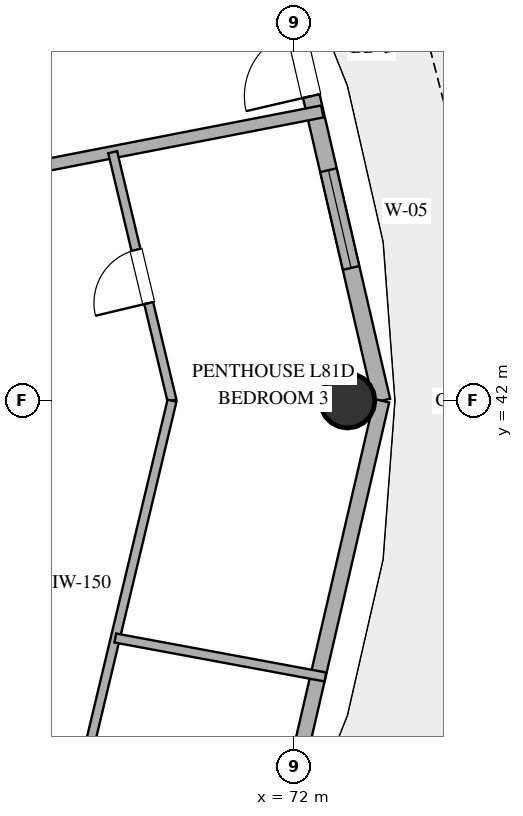
"""IFC4 building model, lengths in metres.
Left out: names, types, materials, properties, quantities, classifications, styles, units other than length and angle.
Written with IfcOpenShell. Run it as: python <this file> out.ifc"""

import sys

from ifc_helpers import new_model, si_unit, direction, frame, frame_2d, origin, origin_2d, place, context, subcontext, project, spatial, rectangle, hollow_circle, extrude, element, fill, save


model = new_model("IFC4")
c1 = context("Model", 3, precision=1e-05, world=origin(), true_north=direction((0.0, 1.0)))
c2 = subcontext(c1, "Body", "Model", "MODEL_VIEW")
j1 = project(units=[si_unit("LENGTHUNIT", "METRE"), si_unit("PLANEANGLEUNIT", "RADIAN")], contexts=[c1])
p1 = place(None, origin())
s1 = spatial("IfcSite", under=j1, at=p1, CompositionType="ELEMENT")
p2 = place(p1, origin())
s2 = spatial("IfcBuilding", under=s1, at=p2, CompositionType="ELEMENT")
p3 = place(p2, frame((0.0, 0.0, 312.6)))
s3 = spatial("IfcBuildingStorey", under=s2, at=p3, CompositionType="ELEMENT", Elevation=312.6)
p4 = place(p3, frame((72.883, 42.0, 0.0), z_axis=(0.0, 0.0, 1.0), x_axis=(1.0, 0.0, 0.0)))
e1 = element("IfcColumn", 1, at=p4, inside=s3, PredefinedType="COLUMN", context=c2, shape_type="SweptSolid", body=[
    extrude(hollow_circle(Radius=0.45, WallThickness=0.025, at=origin_2d()), origin(), (0.0, 0.0, 1.0), 3.64),
])
p5 = place(p3, frame((73.447, 42.0, 0.0), z_axis=(0.0, 0.0, 1.0), x_axis=(-0.225635078214, 0.974211892495, 0.0)))
e2 = element("IfcWall", 2, at=p5, inside=s3, PredefinedType="SOLIDWALL", context=c2, shape_type="SweptSolid", body=[
    extrude(rectangle(XDim=7.77, YDim=0.28, at=frame_2d((3.885, 0.0))), origin(), (0.0, 0.0, 1.0), 3.64),
])
p6 = place(p5, frame((2.241, 0.0, 0.85)))
e3 = element("IfcOpeningElement", 3, at=p6, cuts=e2, PredefinedType="OPENING", context=c2, shape_type="SweptSolid", body=[
    extrude(rectangle(XDim=1.65, YDim=2.0, at=frame_2d((0.825, 1.0))), frame((0.0, 0.15, 0.0), z_axis=(0.0, -1.0, 0.0), x_axis=(1.0, 0.0, 0.0)), (0.0, 0.0, 1.0), 0.3),
])
p7 = place(p5, frame((5.142, 0.0, 0.0)))
e4 = element("IfcOpeningElement", 4, at=p7, cuts=e2, PredefinedType="OPENING", context=c2, shape_type="SweptSolid", body=[
    extrude(rectangle(XDim=1.1, YDim=2.25, at=frame_2d((0.55, 1.125))), frame((0.0, 0.15, 0.0), z_axis=(0.0, -1.0, 0.0), x_axis=(1.0, 0.0, 0.0)), (0.0, 0.0, 1.0), 0.3),
])
p8 = place(p3, frame((71.694, 34.43, 0.0), z_axis=(0.0, 0.0, 1.0), x_axis=(0.225635078214, 0.974211892495, 0.0)))
e5 = element("IfcWall", 5, at=p8, inside=s3, PredefinedType="SOLIDWALL", context=c2, shape_type="SweptSolid", body=[
    extrude(rectangle(XDim=7.77, YDim=0.25, at=frame_2d((3.885, 0.0))), origin(), (0.0, 0.0, 1.0), 3.64),
])
p9 = place(p3, frame((61.2, 44.566, 0.0), z_axis=(0.0, 0.0, 1.0), x_axis=(0.981626456647, 0.190812734402, 0.0)))
e6 = element("IfcWall", 6, at=p9, inside=s3, PredefinedType="PARTITIONING", context=c2, shape_type="SweptSolid", body=[
    extrude(rectangle(XDim=11.479, YDim=0.2, at=frame_2d((5.74, 0.0))), origin(), (0.0, 0.0, 1.0), 2.34),
])
p10 = place(p3, frame((69.996, 42.0, 0.0), z_axis=(0.0, 0.0, 1.0), x_axis=(-0.23229355625, 0.972645723645, 0.0)))
e7 = element("IfcWall", 7, at=p10, inside=s3, PredefinedType="PARTITIONING", context=c2, shape_type="SweptSolid", body=[
    extrude(rectangle(XDim=4.201, YDim=0.15, at=frame_2d((2.101, 0.0))), origin(), (0.0, 0.0, 1.0), 2.34),
])
p11 = place(p10, frame((1.65, 0.0, 0.0)))
e8 = element("IfcOpeningElement", 8, at=p11, cuts=e7, PredefinedType="OPENING", context=c2, shape_type="SweptSolid", body=[
    extrude(rectangle(XDim=0.9, YDim=2.1, at=frame_2d((0.45, 1.05))), frame((0.0, 0.085, 0.0), z_axis=(0.0, -1.0, 0.0), x_axis=(1.0, 0.0, 0.0)), (0.0, 0.0, 1.0), 0.17),
])
p12 = place(p3, frame((68.481, 35.655, 0.0), z_axis=(0.0, 0.0, 1.0), x_axis=(0.232298462197, 0.972644551962, 0.0)))
e9 = element("IfcWall", 9, at=p12, inside=s3, PredefinedType="PARTITIONING", context=c2, shape_type="SweptSolid", body=[
    extrude(rectangle(XDim=6.523, YDim=0.15, at=frame_2d((3.262, 0.0))), origin(), (0.0, 0.0, 1.0), 2.34),
])
p13 = place(p3, frame((72.518, 37.457, 0.0), z_axis=(0.0, 0.0, 1.0), x_axis=(-0.983264946239, 0.182181353322, 0.0)))
e10 = element("IfcWall", 10, at=p13, inside=s3, PredefinedType="PARTITIONING", context=c2, shape_type="SweptSolid", body=[
    extrude(rectangle(XDim=3.512, YDim=0.15, at=frame_2d((1.756, 0.0))), origin(), (0.0, 0.0, 1.0), 2.34),
])
p14 = place(p6, origin())
e11 = element("IfcWindow", 11, at=p14, inside=s3, PartitioningType="SINGLE_PANEL", PredefinedType="WINDOW", context=c2, shape_type="SweptSolid", body=[
    extrude(rectangle(XDim=1.65, YDim=2.0, at=frame_2d((0.825, 1.0))), frame((0.0, 0.03, 0.0), z_axis=(0.0, -1.0, 0.0), x_axis=(1.0, 0.0, 0.0)), (0.0, 0.0, 1.0), 0.06),
])
fill(e3, e11)
p15 = place(p7, origin())
e12 = element("IfcDoor", 12, at=p15, inside=s3, OperationType="SINGLE_SWING_LEFT", PredefinedType="DOOR", context=c2, shape_type="SweptSolid", body=[
    extrude(rectangle(XDim=1.1, YDim=2.25, at=frame_2d((0.55, 1.125))), frame((0.0, 0.025, 0.0), z_axis=(0.0, -1.0, 0.0), x_axis=(1.0, 0.0, 0.0)), (0.0, 0.0, 1.0), 0.05),
])
fill(e4, e12)
p16 = place(p11, origin())
e13 = element("IfcDoor", 13, at=p16, inside=s3, OperationType="SINGLE_SWING_LEFT", PredefinedType="DOOR", context=c2, shape_type="SweptSolid", body=[
    extrude(rectangle(XDim=0.9, YDim=2.1, at=frame_2d((0.45, 1.05))), frame((0.0, 0.025, 0.0), z_axis=(0.0, -1.0, 0.0), x_axis=(1.0, 0.0, 0.0)), (0.0, 0.0, 1.0), 0.05),
])
fill(e8, e13)
save(model, sys.argv[1])
